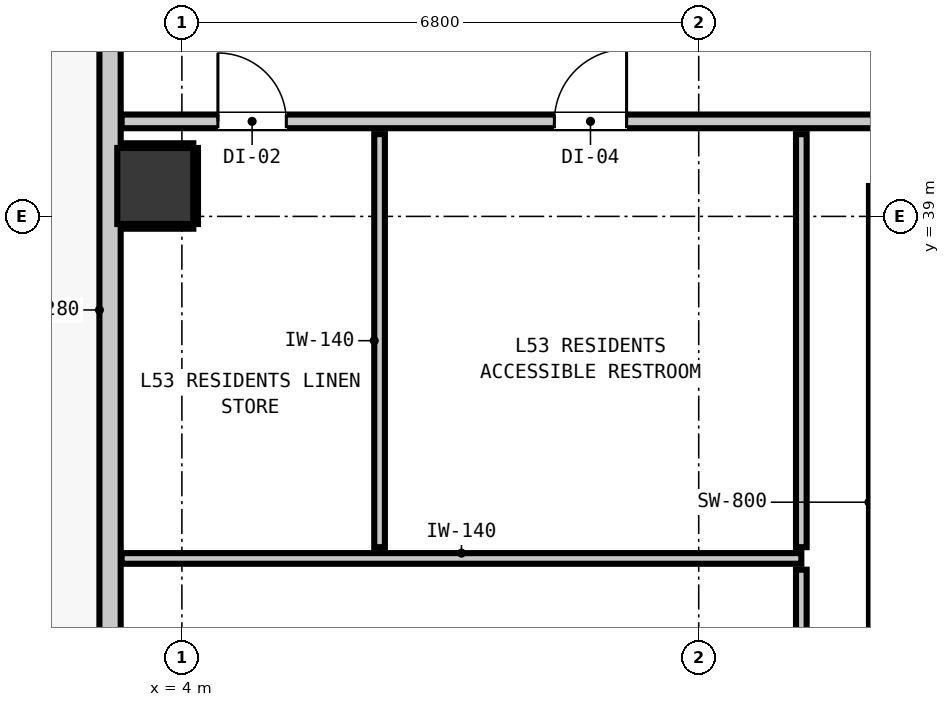
"""IFC4 building model, lengths in metres.
Left out: names, types, materials, properties, quantities, classifications, styles, units other than length and angle.
Written with IfcOpenShell. Run it as: python <this file> out.ifc"""

import sys

from ifc_helpers import new_model, si_unit, direction, frame, frame_2d, origin, origin_2d, place, context, subcontext, project, spatial, rectangle, extrude, element, fill, save


model = new_model("IFC4")
c1 = context("Model", 3, precision=1e-05, world=origin(), true_north=direction((0.0, 1.0)))
c2 = subcontext(c1, "Body", "Model", "MODEL_VIEW")
j1 = project(units=[si_unit("LENGTHUNIT", "METRE"), si_unit("PLANEANGLEUNIT", "RADIAN")], contexts=[c1])
p1 = place(None, origin())
s1 = spatial("IfcSite", under=j1, at=p1, CompositionType="ELEMENT")
p2 = place(p1, origin())
s2 = spatial("IfcBuilding", under=s1, at=p2, CompositionType="ELEMENT")
p3 = place(p2, frame((0.0, 0.0, 183.52)))
s3 = spatial("IfcBuildingStorey", under=s2, at=p3, CompositionType="ELEMENT", Elevation=183.52)
p4 = place(p3, frame((13.44, 31.08, 0.0), z_axis=(0.0, 0.0, 1.0), x_axis=(0.0, 1.0, 0.0)))
e1 = element("IfcWall", 1, at=p4, inside=s3, PredefinedType="SHEAR", context=c2, shape_type="SweptSolid", body=[
    extrude(rectangle(XDim=8.32, YDim=0.8, at=frame_2d((4.16, 0.0))), origin(), (0.0, 0.0, 1.0), 3.32),
])
p5 = place(p3, frame((3.65, 39.4, 0.0), z_axis=(0.0, 0.0, 1.0), x_axis=(1.0, 0.0, 0.0)))
e2 = element("IfcColumn", 2, at=p5, inside=s3, PredefinedType="COLUMN", context=c2, shape_type="SweptSolid", body=[
    extrude(rectangle(XDim=1.0, YDim=1.0, at=origin_2d()), origin(), (0.0, 0.0, 1.0), 3.32),
])
p6 = place(p3, frame((3.055, 17.555, 0.0), z_axis=(0.0, 0.0, 1.0), x_axis=(0.0, 1.0, 0.0)))
e3 = element("IfcWall", 3, at=p6, inside=s3, PredefinedType="STANDARD", context=c2, shape_type="SweptSolid", body=[
    extrude(rectangle(XDim=32.29, YDim=0.28, at=frame_2d((16.145, 0.0))), origin(), (0.0, 0.0, 1.0), 3.08),
])
p7 = place(p6, frame((5.467, 0.0, 0.0)))
e4 = element("IfcOpeningElement", 4, at=p7, cuts=e3, PredefinedType="OPENING", context=c2, shape_type="SweptSolid", body=[
    extrude(rectangle(XDim=1.0, YDim=2.15, at=frame_2d((0.5, 1.075))), frame((0.0, 0.15, 0.0), z_axis=(0.0, -1.0, 0.0), x_axis=(1.0, 0.0, 0.0)), (0.0, 0.0, 1.0), 0.3),
])
p8 = place(p6, frame((30.247, 0.0, 0.85)))
e5 = element("IfcOpeningElement", 5, at=p8, cuts=e3, PredefinedType="OPENING", context=c2, shape_type="SweptSolid", body=[
    extrude(rectangle(XDim=1.05, YDim=1.65, at=frame_2d((0.525, 0.825))), frame((0.0, 0.15, 0.0), z_axis=(0.0, -1.0, 0.0), x_axis=(1.0, 0.0, 0.0)), (0.0, 0.0, 1.0), 0.3),
])
p9 = place(p6, frame((9.131, 0.0, 0.85)))
e6 = element("IfcOpeningElement", 6, at=p9, cuts=e3, PredefinedType="OPENING", context=c2, shape_type="SweptSolid", body=[
    extrude(rectangle(XDim=1.05, YDim=1.65, at=frame_2d((0.525, 0.825))), frame((0.0, 0.15, 0.0), z_axis=(0.0, -1.0, 0.0), x_axis=(1.0, 0.0, 0.0)), (0.0, 0.0, 1.0), 0.3),
])
p10 = place(p3, frame((3.207, 40.25, 0.0), z_axis=(0.0, 0.0, 1.0), x_axis=(1.0, 0.0, 0.0)))
e7 = element("IfcWall", 7, at=p10, inside=s3, PredefinedType="PARTITIONING", context=c2, shape_type="SweptSolid", body=[
    extrude(rectangle(XDim=39.386, YDim=0.18, at=frame_2d((19.693, 0.0))), origin(), (0.0, 0.0, 1.0), 3.08),
])
p11 = place(p10, frame((14.228, 0.0, 0.0)))
e8 = element("IfcOpeningElement", 8, at=p11, cuts=e7, PredefinedType="OPENING", context=c2, shape_type="SweptSolid", body=[
    extrude(rectangle(XDim=1.4, YDim=2.15, at=frame_2d((0.7, 1.075))), frame((0.0, 0.1, 0.0), z_axis=(0.0, -1.0, 0.0), x_axis=(1.0, 0.0, 0.0)), (0.0, 0.0, 1.0), 0.2),
])
p12 = place(p10, frame((1.267, 0.0, 0.0)))
e9 = element("IfcOpeningElement", 9, at=p12, cuts=e7, PredefinedType="OPENING", context=c2, shape_type="SweptSolid", body=[
    extrude(rectangle(XDim=0.9, YDim=2.1, at=frame_2d((0.45, 1.05))), frame((0.0, 0.1, 0.0), z_axis=(0.0, -1.0, 0.0), x_axis=(1.0, 0.0, 0.0)), (0.0, 0.0, 1.0), 0.2),
])
p13 = place(p10, frame((5.694, 0.0, 0.0)))
e10 = element("IfcOpeningElement", 10, at=p13, cuts=e7, PredefinedType="OPENING", context=c2, shape_type="SweptSolid", body=[
    extrude(rectangle(XDim=0.95, YDim=2.1, at=frame_2d((0.475, 1.05))), frame((0.0, 0.1, 0.0), z_axis=(0.0, -1.0, 0.0), x_axis=(1.0, 0.0, 0.0)), (0.0, 0.0, 1.0), 0.2),
])
p14 = place(p10, frame((36.494, 0.0, 0.0)))
e11 = element("IfcOpeningElement", 11, at=p14, cuts=e7, PredefinedType="OPENING", context=c2, shape_type="SweptSolid", body=[
    extrude(rectangle(XDim=0.9, YDim=2.1, at=frame_2d((0.45, 1.05))), frame((0.0, 0.1, 0.0), z_axis=(0.0, -1.0, 0.0), x_axis=(1.0, 0.0, 0.0)), (0.0, 0.0, 1.0), 0.2),
])
p15 = place(p3, frame((3.207, 34.5, 0.0), z_axis=(0.0, 0.0, 1.0), x_axis=(1.0, 0.0, 0.0)))
e12 = element("IfcWall", 12, at=p15, inside=s3, PredefinedType="PARTITIONING", context=c2, shape_type="SweptSolid", body=[
    extrude(rectangle(XDim=8.943, YDim=0.14, at=frame_2d((4.471, 0.0))), origin(), (0.0, 0.0, 1.0), 3.08),
])
p16 = place(p3, frame((6.601, 34.648, 0.0), z_axis=(0.0, 0.0, 1.0), x_axis=(0.0, 1.0, 0.0)))
e13 = element("IfcWall", 13, at=p16, inside=s3, PredefinedType="PARTITIONING", context=c2, shape_type="SweptSolid", body=[
    extrude(rectangle(XDim=5.434, YDim=0.14, at=frame_2d((2.717, 0.0))), origin(), (0.0, 0.0, 1.0), 3.08),
])
p17 = place(p3, frame((12.15, 21.348, 0.0), z_axis=(0.0, 0.0, 1.0), x_axis=(0.0, 1.0, 0.0)))
e14 = element("IfcWall", 14, at=p17, inside=s3, PredefinedType="PARTITIONING", context=c2, shape_type="SweptSolid", body=[
    extrude(rectangle(XDim=13.004, YDim=0.14, at=frame_2d((6.502, 0.0))), origin(), (0.0, 0.0, 1.0), 3.08),
])
p18 = place(p3, frame((12.15, 34.648, 0.0), z_axis=(0.0, 0.0, 1.0), x_axis=(0.0, 1.0, 0.0)))
e15 = element("IfcWall", 15, at=p18, inside=s3, PredefinedType="PARTITIONING", context=c2, shape_type="SweptSolid", body=[
    extrude(rectangle(XDim=5.434, YDim=0.14, at=frame_2d((2.717, 0.0))), origin(), (0.0, 0.0, 1.0), 3.08),
])
for number, where, z_axis, x_axis in (
    (16, (3.21, 38.868, 0.0), (0.0, 0.0, 1.0), (1.0, 0.0, 0.0)),
    (17, (3.21, 39.932, 0.0), (0.0, 0.0, 1.0), (1.0, 0.0, 0.0)),
):
    element("IfcWall", number, at=place(p3, frame(where, z_axis=z_axis, x_axis=x_axis)), inside=s3, PredefinedType="PARTITIONING", context=c2, shape_type="SweptSolid", body=[
        extrude(rectangle(XDim=0.94, YDim=0.06, at=frame_2d((0.47, 0.0))), origin(), (0.0, 0.0, 1.0), 1.45),
    ])
p19 = place(p3, frame((4.182, 38.9, 0.0), z_axis=(0.0, 0.0, 1.0), x_axis=(0.0, 1.0, 0.0)))
e18 = element("IfcWall", 18, at=p19, inside=s3, PredefinedType="PARTITIONING", context=c2, shape_type="SweptSolid", body=[
    extrude(rectangle(XDim=1.0, YDim=0.06, at=frame_2d((0.5, 0.0))), origin(), (0.0, 0.0, 1.0), 1.45),
])
p20 = place(p12, origin())
e19 = element("IfcDoor", 19, at=p20, inside=s3, OperationType="SINGLE_SWING_LEFT", PredefinedType="DOOR", context=c2, shape_type="SweptSolid", body=[
    extrude(rectangle(XDim=0.9, YDim=2.1, at=frame_2d((0.45, 1.05))), frame((0.0, 0.025, 0.0), z_axis=(0.0, -1.0, 0.0), x_axis=(1.0, 0.0, 0.0)), (0.0, 0.0, 1.0), 0.05),
])
fill(e9, e19)
p21 = place(p13, origin())
e20 = element("IfcDoor", 20, at=p21, inside=s3, OperationType="SINGLE_SWING_RIGHT", PredefinedType="DOOR", context=c2, shape_type="SweptSolid", body=[
    extrude(rectangle(XDim=0.95, YDim=2.1, at=frame_2d((0.475, 1.05))), frame((0.0, 0.025, 0.0), z_axis=(0.0, -1.0, 0.0), x_axis=(1.0, 0.0, 0.0)), (0.0, 0.0, 1.0), 0.05),
])
fill(e10, e20)
save(model, sys.argv[1])
